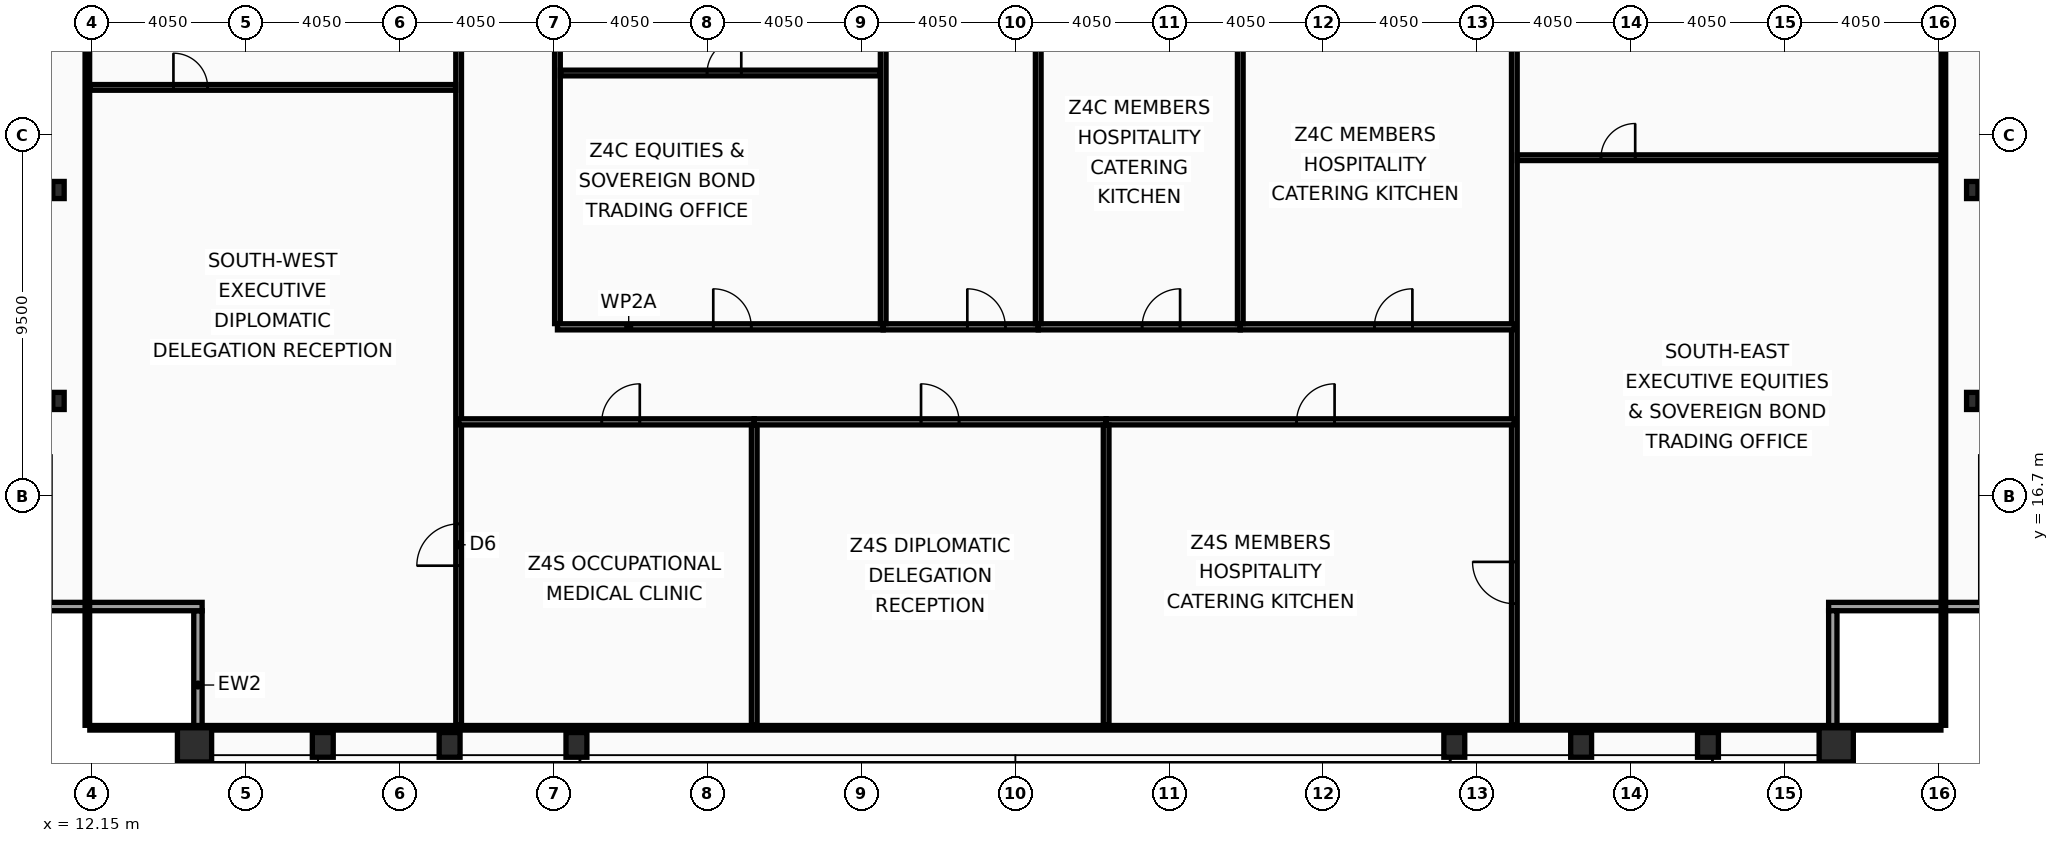
"""IFC4 building model, lengths in metres.
Left out: names, types, materials, properties, quantities, classifications, styles, units other than length and angle.
Written with IfcOpenShell. Run it as: python <this file> out.ifc"""

import sys

from ifc_helpers import new_model, si_unit, direction, frame, frame_2d, origin, origin_2d, place, context, subcontext, project, spatial, rectangle, hollow_rectangle, i_section, extrude, element, fill, save


model = new_model("IFC4")
c1 = context("Model", 3, precision=1e-05, world=origin(), true_north=direction((0.0, 1.0)))
c2 = subcontext(c1, "Body", "Model", "MODEL_VIEW")
j1 = project(units=[si_unit("LENGTHUNIT", "METRE"), si_unit("PLANEANGLEUNIT", "RADIAN")], contexts=[c1])
p1 = place(None, origin())
s1 = spatial("IfcSite", under=j1, at=p1, CompositionType="ELEMENT")
p2 = place(p1, origin())
s2 = spatial("IfcBuilding", under=s1, at=p2, CompositionType="ELEMENT")
p3 = place(p2, frame((0.0, 0.0, 321.8)))
s3 = spatial("IfcBuildingStorey", under=s2, at=p3, CompositionType="ELEMENT", Elevation=321.8)
for number, where, z_axis, x_axis in (
    (1, (14.85, 10.15, 0.0), (0.0, 0.0, 1.0), (1.0, 0.0, 0.0)),
    (2, (58.05, 10.15, 0.0), (0.0, 0.0, 1.0), (1.0, 0.0, 0.0)),
):
    element("IfcColumn", number, at=place(p3, frame(where, z_axis=z_axis, x_axis=x_axis)), inside=s3, PredefinedType="COLUMN", context=c2, shape_type="SweptSolid", body=[
        extrude(hollow_rectangle(XDim=0.9, YDim=0.9, WallThickness=0.05, at=origin_2d()), origin(), (0.0, 0.0, 1.0), 3.6),
    ])
for number, where, z_axis, x_axis in (
    (3, (18.225, 10.15, 0.0), (0.0, 0.0, 1.0), (1.0, 0.0, 0.0)),
    (4, (21.562, 10.15, 0.0), (0.0, 0.0, 1.0), (1.0, 0.0, 0.0)),
    (5, (24.9, 10.15, 0.0), (0.0, 0.0, 1.0), (1.0, 0.0, 0.0)),
    (6, (48.0, 10.15, 0.0), (0.0, 0.0, 1.0), (1.0, 0.0, 0.0)),
    (7, (51.337, 10.15, 0.0), (0.0, 0.0, 1.0), (1.0, 0.0, 0.0)),
    (8, (54.675, 10.15, 0.0), (0.0, 0.0, 1.0), (1.0, 0.0, 0.0)),
):
    element("IfcColumn", number, at=place(p3, frame(where, z_axis=z_axis, x_axis=x_axis)), inside=s3, PredefinedType="COLUMN", context=c2, shape_type="SweptSolid", body=[
        extrude(hollow_rectangle(XDim=0.55, YDim=0.65, WallThickness=0.04, at=origin_2d()), origin(), (0.0, 0.0, 1.0), 3.6),
    ])
for number, where, z_axis, x_axis in (
    (9, (11.27, 19.2, 0.0), (0.0, 0.0, 1.0), (1.0, 0.0, 0.0)),
    (10, (11.27, 24.75, 0.0), (0.0, 0.0, 1.0), (1.0, 0.0, 0.0)),
    (11, (61.63, 19.2, 0.0), (0.0, 0.0, 1.0), (1.0, 0.0, 0.0)),
    (12, (61.63, 24.75, 0.0), (0.0, 0.0, 1.0), (1.0, 0.0, 0.0)),
):
    element("IfcColumn", number, at=place(p3, frame(where, z_axis=z_axis, x_axis=x_axis)), inside=s3, PredefinedType="COLUMN", context=c2, shape_type="SweptSolid", body=[
        extrude(i_section(OverallWidth=0.3, OverallDepth=0.45, WebThickness=0.014, FlangeThickness=0.026, at=origin_2d()), origin(), (0.0, 0.0, 1.0), 3.6),
    ])
p4 = place(p3, frame((14.94, 9.77, 0.0), z_axis=(0.0, 0.0, 1.0), x_axis=(0.0, 1.0, 0.0)))
e13 = element("IfcWall", 13, at=p4, inside=s3, PredefinedType="SOLIDWALL", context=c2, shape_type="SweptSolid", body=[
    extrude(rectangle(XDim=3.91, YDim=0.22, at=frame_2d((1.955, 0.0))), origin(), (0.0, 0.0, 1.0), 2.88),
])
for number, where, z_axis, x_axis in (
    (14, (15.05, 13.79, 0.0), (0.0, 0.0, 1.0), (-1.0, 0.0, 0.0)),
    (15, (62.07, 13.79, 0.0), (0.0, 0.0, 1.0), (-1.0, 0.0, 0.0)),
):
    element("IfcWall", number, at=place(p3, frame(where, z_axis=z_axis, x_axis=x_axis)), inside=s3, PredefinedType="SOLIDWALL", context=c2, shape_type="SweptSolid", body=[
        extrude(rectangle(XDim=4.22, YDim=0.22, at=frame_2d((2.11, 0.0))), origin(), (0.0, 0.0, 1.0), 2.88),
    ])
p5 = place(p3, frame((57.96, 13.68, 0.0), z_axis=(0.0, 0.0, 1.0), x_axis=(0.0, -1.0, 0.0)))
e16 = element("IfcWall", 16, at=p5, inside=s3, PredefinedType="SOLIDWALL", context=c2, shape_type="SweptSolid", body=[
    extrude(rectangle(XDim=3.91, YDim=0.22, at=frame_2d((1.955, 0.0))), origin(), (0.0, 0.0, 1.0), 2.88),
])
p6 = place(p3, frame((21.8, 10.665, 0.0), z_axis=(0.0, 0.0, 1.0), x_axis=(0.0, 1.0, 0.0)))
e17 = element("IfcWall", 17, at=p6, inside=s3, PredefinedType="PARTITIONING", context=c2, shape_type="SweptSolid", body=[
    extrude(rectangle(XDim=24.955, YDim=0.15, at=frame_2d((12.478, 0.0))), origin(), (0.0, 0.0, 1.0), 3.07),
])
p7 = place(p6, frame((4.2, 0.0, 0.0)))
e18 = element("IfcOpeningElement", 18, at=p7, cuts=e17, PredefinedType="OPENING", context=c2, shape_type="SweptSolid", body=[
    extrude(rectangle(XDim=1.1, YDim=2.1, at=frame_2d((0.55, 1.05))), frame((0.0, 0.085, 0.0), z_axis=(0.0, -1.0, 0.0), x_axis=(1.0, 0.0, 0.0)), (0.0, 0.0, 1.0), 0.17),
])
p8 = place(p3, frame((12.095, 27.45, 0.0), z_axis=(0.0, 0.0, 1.0), x_axis=(1.0, 0.0, 0.0)))
e19 = element("IfcWall", 19, at=p8, inside=s3, PredefinedType="PARTITIONING", context=c2, shape_type="SweptSolid", body=[
    extrude(rectangle(XDim=9.625, YDim=0.15, at=frame_2d((4.812, 0.0))), origin(), (0.0, 0.0, 1.0), 2.83),
])
p9 = place(p8, frame((2.2, 0.0, 0.0)))
e20 = element("IfcOpeningElement", 20, at=p9, cuts=e19, PredefinedType="OPENING", context=c2, shape_type="SweptSolid", body=[
    extrude(rectangle(XDim=0.9, YDim=2.05, at=frame_2d((0.45, 1.025))), frame((0.0, 0.085, 0.0), z_axis=(0.0, -1.0, 0.0), x_axis=(1.0, 0.0, 0.0)), (0.0, 0.0, 1.0), 0.17),
])
p10 = place(p3, frame((24.4, 21.235, 0.0), z_axis=(0.0, 0.0, 1.0), x_axis=(0.0, 1.0, 0.0)))
e21 = element("IfcWall", 21, at=p10, inside=s3, PredefinedType="PARTITIONING", context=c2, shape_type="SweptSolid", body=[
    extrude(rectangle(XDim=14.385, YDim=0.15, at=frame_2d((7.192, 0.0))), origin(), (0.0, 0.0, 1.0), 2.83),
])
p11 = place(p3, frame((49.58, 10.665, 0.0), z_axis=(0.0, 0.0, 1.0), x_axis=(0.0, 1.0, 0.0)))
e22 = element("IfcWall", 22, at=p11, inside=s3, PredefinedType="PARTITIONING", context=c2, shape_type="SweptSolid", body=[
    extrude(rectangle(XDim=24.955, YDim=0.15, at=frame_2d((12.478, 0.0))), origin(), (0.0, 0.0, 1.0), 3.07),
])
p12 = place(p11, frame((3.2, 0.0, 0.0)))
e23 = element("IfcOpeningElement", 23, at=p12, cuts=e22, PredefinedType="OPENING", context=c2, shape_type="SweptSolid", body=[
    extrude(rectangle(XDim=1.1, YDim=2.1, at=frame_2d((0.55, 1.05))), frame((0.0, 0.085, 0.0), z_axis=(0.0, -1.0, 0.0), x_axis=(1.0, 0.0, 0.0)), (0.0, 0.0, 1.0), 0.17),
])
p13 = place(p3, frame((49.66, 25.6, 0.0), z_axis=(0.0, 0.0, 1.0), x_axis=(1.0, 0.0, 0.0)))
e24 = element("IfcWall", 24, at=p13, inside=s3, PredefinedType="PARTITIONING", context=c2, shape_type="SweptSolid", body=[
    extrude(rectangle(XDim=11.145, YDim=0.15, at=frame_2d((5.573, 0.0))), origin(), (0.0, 0.0, 1.0), 2.83),
])
p14 = place(p13, frame((2.2, 0.0, 0.0)))
e25 = element("IfcOpeningElement", 25, at=p14, cuts=e24, PredefinedType="OPENING", context=c2, shape_type="SweptSolid", body=[
    extrude(rectangle(XDim=0.9, YDim=2.05, at=frame_2d((0.45, 1.025))), frame((0.0, 0.085, 0.0), z_axis=(0.0, -1.0, 0.0), x_axis=(1.0, 0.0, 0.0)), (0.0, 0.0, 1.0), 0.17),
])
p15 = place(p3, frame((24.4, 21.15, 0.0), z_axis=(0.0, 0.0, 1.0), x_axis=(1.0, 0.0, 0.0)))
e26 = element("IfcWall", 26, at=p15, inside=s3, PredefinedType="PARTITIONING", context=c2, shape_type="SweptSolid", body=[
    extrude(rectangle(XDim=8.572, YDim=0.16, at=frame_2d((4.286, 0.0))), origin(), (0.0, 0.0, 1.0), 2.83),
])
p16 = place(p15, frame((4.1, 0.0, 0.0)))
e27 = element("IfcOpeningElement", 27, at=p16, cuts=e26, PredefinedType="OPENING", context=c2, shape_type="SweptSolid", body=[
    extrude(rectangle(XDim=1.0, YDim=2.05, at=frame_2d((0.5, 1.025))), frame((0.0, 0.09, 0.0), z_axis=(0.0, -1.0, 0.0), x_axis=(1.0, 0.0, 0.0)), (0.0, 0.0, 1.0), 0.18),
])
p17 = place(p3, frame((24.48, 27.829, 0.0), z_axis=(0.0, 0.0, 1.0), x_axis=(1.0, 0.0, 0.0)))
e28 = element("IfcWall", 28, at=p17, inside=s3, PredefinedType="PARTITIONING", context=c2, shape_type="SweptSolid", body=[
    extrude(rectangle(XDim=8.412, YDim=0.15, at=frame_2d((4.206, 0.0))), origin(), (0.0, 0.0, 1.0), 2.83),
])
p18 = place(p17, frame((3.857, 0.0, 0.0)))
e29 = element("IfcOpeningElement", 29, at=p18, cuts=e28, PredefinedType="OPENING", context=c2, shape_type="SweptSolid", body=[
    extrude(rectangle(XDim=0.9, YDim=2.05, at=frame_2d((0.45, 1.025))), frame((0.0, 0.085, 0.0), z_axis=(0.0, -1.0, 0.0), x_axis=(1.0, 0.0, 0.0)), (0.0, 0.0, 1.0), 0.17),
])
p19 = place(p3, frame((32.972, 21.15, 0.0), z_axis=(0.0, 0.0, 1.0), x_axis=(1.0, 0.0, 0.0)))
e30 = element("IfcWall", 30, at=p19, inside=s3, PredefinedType="PARTITIONING", context=c2, shape_type="SweptSolid", body=[
    extrude(rectangle(XDim=4.08, YDim=0.16, at=frame_2d((2.04, 0.0))), origin(), (0.0, 0.0, 1.0), 3.44),
])
p20 = place(p19, frame((2.214, 0.0, 0.0)))
e31 = element("IfcOpeningElement", 31, at=p20, cuts=e30, PredefinedType="OPENING", context=c2, shape_type="SweptSolid", body=[
    extrude(rectangle(XDim=1.0, YDim=2.05, at=frame_2d((0.5, 1.025))), frame((0.0, 0.09, 0.0), z_axis=(0.0, -1.0, 0.0), x_axis=(1.0, 0.0, 0.0)), (0.0, 0.0, 1.0), 0.18),
])
p21 = place(p3, frame((32.972, 21.235, 0.0), z_axis=(0.0, 0.0, 1.0), x_axis=(0.0, 1.0, 0.0)))
e32 = element("IfcWall", 32, at=p21, inside=s3, PredefinedType="PARTITIONING", context=c2, shape_type="SweptSolid", body=[
    extrude(rectangle(XDim=14.385, YDim=0.15, at=frame_2d((7.192, 0.0))), origin(), (0.0, 0.0, 1.0), 3.07),
])
p22 = place(p3, frame((37.052, 21.15, 0.0), z_axis=(0.0, 0.0, 1.0), x_axis=(1.0, 0.0, 0.0)))
e33 = element("IfcWall", 33, at=p22, inside=s3, PredefinedType="PARTITIONING", context=c2, shape_type="SweptSolid", body=[
    extrude(rectangle(XDim=5.316, YDim=0.16, at=frame_2d((2.658, 0.0))), origin(), (0.0, 0.0, 1.0), 3.44),
])
p23 = place(p22, frame((2.733, 0.0, 0.0)))
e34 = element("IfcOpeningElement", 34, at=p23, cuts=e33, PredefinedType="OPENING", context=c2, shape_type="SweptSolid", body=[
    extrude(rectangle(XDim=1.0, YDim=2.05, at=frame_2d((0.5, 1.025))), frame((0.0, 0.09, 0.0), z_axis=(0.0, -1.0, 0.0), x_axis=(1.0, 0.0, 0.0)), (0.0, 0.0, 1.0), 0.18),
])
p24 = place(p3, frame((37.052, 21.235, 0.0), z_axis=(0.0, 0.0, 1.0), x_axis=(0.0, 1.0, 0.0)))
e35 = element("IfcWall", 35, at=p24, inside=s3, PredefinedType="PARTITIONING", context=c2, shape_type="SweptSolid", body=[
    extrude(rectangle(XDim=14.385, YDim=0.15, at=frame_2d((7.192, 0.0))), origin(), (0.0, 0.0, 1.0), 3.07),
])
p25 = place(p3, frame((42.368, 21.15, 0.0), z_axis=(0.0, 0.0, 1.0), x_axis=(1.0, 0.0, 0.0)))
e36 = element("IfcWall", 36, at=p25, inside=s3, PredefinedType="PARTITIONING", context=c2, shape_type="SweptSolid", body=[
    extrude(rectangle(XDim=7.212, YDim=0.16, at=frame_2d((3.606, 0.0))), origin(), (0.0, 0.0, 1.0), 2.83),
])
p26 = place(p25, frame((3.529, 0.0, 0.0)))
e37 = element("IfcOpeningElement", 37, at=p26, cuts=e36, PredefinedType="OPENING", context=c2, shape_type="SweptSolid", body=[
    extrude(rectangle(XDim=1.0, YDim=2.05, at=frame_2d((0.5, 1.025))), frame((0.0, 0.09, 0.0), z_axis=(0.0, -1.0, 0.0), x_axis=(1.0, 0.0, 0.0)), (0.0, 0.0, 1.0), 0.18),
])
p27 = place(p3, frame((42.368, 21.235, 0.0), z_axis=(0.0, 0.0, 1.0), x_axis=(0.0, 1.0, 0.0)))
e38 = element("IfcWall", 38, at=p27, inside=s3, PredefinedType="PARTITIONING", context=c2, shape_type="SweptSolid", body=[
    extrude(rectangle(XDim=14.385, YDim=0.15, at=frame_2d((7.192, 0.0))), origin(), (0.0, 0.0, 1.0), 3.07),
])
p28 = place(p3, frame((21.8, 18.65, 0.0), z_axis=(0.0, 0.0, 1.0), x_axis=(1.0, 0.0, 0.0)))
e39 = element("IfcWall", 39, at=p28, inside=s3, PredefinedType="PARTITIONING", context=c2, shape_type="SweptSolid", body=[
    extrude(rectangle(XDim=7.778, YDim=0.16, at=frame_2d((3.889, 0.0))), origin(), (0.0, 0.0, 1.0), 2.83),
])
p29 = place(p28, frame((3.767, 0.0, 0.0)))
e40 = element("IfcOpeningElement", 40, at=p29, cuts=e39, PredefinedType="OPENING", context=c2, shape_type="SweptSolid", body=[
    extrude(rectangle(XDim=1.0, YDim=2.05, at=frame_2d((0.5, 1.025))), frame((0.0, 0.09, 0.0), z_axis=(0.0, -1.0, 0.0), x_axis=(1.0, 0.0, 0.0)), (0.0, 0.0, 1.0), 0.18),
])
p30 = place(p3, frame((29.578, 18.65, 0.0), z_axis=(0.0, 0.0, 1.0), x_axis=(1.0, 0.0, 0.0)))
e41 = element("IfcWall", 41, at=p30, inside=s3, PredefinedType="PARTITIONING", context=c2, shape_type="SweptSolid", body=[
    extrude(rectangle(XDim=9.26, YDim=0.16, at=frame_2d((4.63, 0.0))), origin(), (0.0, 0.0, 1.0), 3.44),
])
p31 = place(p30, frame((4.389, 0.0, 0.0)))
e42 = element("IfcOpeningElement", 42, at=p31, cuts=e41, PredefinedType="OPENING", context=c2, shape_type="SweptSolid", body=[
    extrude(rectangle(XDim=1.0, YDim=2.05, at=frame_2d((0.5, 1.025))), frame((0.0, 0.09, 0.0), z_axis=(0.0, -1.0, 0.0), x_axis=(1.0, 0.0, 0.0)), (0.0, 0.0, 1.0), 0.18),
])
p32 = place(p3, frame((29.578, 10.665, 0.0), z_axis=(0.0, 0.0, 1.0), x_axis=(0.0, 1.0, 0.0)))
e43 = element("IfcWall", 43, at=p32, inside=s3, PredefinedType="PARTITIONING", context=c2, shape_type="SweptSolid", body=[
    extrude(rectangle(XDim=7.9, YDim=0.15, at=frame_2d((3.95, 0.0))), origin(), (0.0, 0.0, 1.0), 3.07),
])
p33 = place(p3, frame((38.838, 18.65, 0.0), z_axis=(0.0, 0.0, 1.0), x_axis=(1.0, 0.0, 0.0)))
e44 = element("IfcWall", 44, at=p33, inside=s3, PredefinedType="PARTITIONING", context=c2, shape_type="SweptSolid", body=[
    extrude(rectangle(XDim=10.742, YDim=0.16, at=frame_2d((5.371, 0.0))), origin(), (0.0, 0.0, 1.0), 2.83),
])
p34 = place(p33, frame((5.011, 0.0, 0.0)))
e45 = element("IfcOpeningElement", 45, at=p34, cuts=e44, PredefinedType="OPENING", context=c2, shape_type="SweptSolid", body=[
    extrude(rectangle(XDim=1.0, YDim=2.05, at=frame_2d((0.5, 1.025))), frame((0.0, 0.09, 0.0), z_axis=(0.0, -1.0, 0.0), x_axis=(1.0, 0.0, 0.0)), (0.0, 0.0, 1.0), 0.18),
])
p35 = place(p3, frame((38.838, 10.665, 0.0), z_axis=(0.0, 0.0, 1.0), x_axis=(0.0, 1.0, 0.0)))
e46 = element("IfcWall", 46, at=p35, inside=s3, PredefinedType="PARTITIONING", context=c2, shape_type="SweptSolid", body=[
    extrude(rectangle(XDim=7.9, YDim=0.15, at=frame_2d((3.95, 0.0))), origin(), (0.0, 0.0, 1.0), 3.07),
])
for number, where, z_axis, x_axis in (
    (47, (12.03, 10.665, 0.0), (0.0, 0.0, 1.0), (0.0, 1.0, 0.0)),
    (48, (60.87, 10.665, 0.0), (0.0, 0.0, 1.0), (0.0, 1.0, 0.0)),
):
    element("IfcWall", number, at=place(p3, frame(where, z_axis=z_axis, x_axis=x_axis)), inside=s3, PredefinedType="PARTITIONING", context=c2, shape_type="SweptSolid", body=[
        extrude(rectangle(XDim=42.11, YDim=0.12, at=frame_2d((21.055, 0.0))), origin(), (0.0, 0.0, 1.0), 2.83),
    ])
p36 = place(p3, frame((12.095, 10.6, 0.0), z_axis=(0.0, 0.0, 1.0), x_axis=(1.0, 0.0, 0.0)))
e49 = element("IfcWall", 49, at=p36, inside=s3, PredefinedType="PARTITIONING", context=c2, shape_type="SweptSolid", body=[
    extrude(rectangle(XDim=48.71, YDim=0.12, at=frame_2d((24.355, 0.0))), origin(), (0.0, 0.0, 1.0), 2.83),
])
p37 = place(p7, origin())
e50 = element("IfcDoor", 50, at=p37, inside=s3, OperationType="SINGLE_SWING_LEFT", PredefinedType="DOOR", context=c2, shape_type="SweptSolid", body=[
    extrude(rectangle(XDim=1.1, YDim=2.1, at=frame_2d((0.55, 1.05))), frame((0.0, 0.025, 0.0), z_axis=(0.0, -1.0, 0.0), x_axis=(1.0, 0.0, 0.0)), (0.0, 0.0, 1.0), 0.05),
])
fill(e18, e50)
p38 = place(p9, origin())
e51 = element("IfcDoor", 51, at=p38, inside=s3, OperationType="SINGLE_SWING_LEFT", PredefinedType="DOOR", context=c2, shape_type="SweptSolid", body=[
    extrude(rectangle(XDim=0.9, YDim=2.05, at=frame_2d((0.45, 1.025))), frame((0.0, 0.025, 0.0), z_axis=(0.0, -1.0, 0.0), x_axis=(1.0, 0.0, 0.0)), (0.0, 0.0, 1.0), 0.05),
])
fill(e20, e51)
p39 = place(p12, origin())
e52 = element("IfcDoor", 52, at=p39, inside=s3, OperationType="SINGLE_SWING_RIGHT", PredefinedType="DOOR", context=c2, shape_type="SweptSolid", body=[
    extrude(rectangle(XDim=1.1, YDim=2.1, at=frame_2d((0.55, 1.05))), frame((0.0, 0.025, 0.0), z_axis=(0.0, -1.0, 0.0), x_axis=(1.0, 0.0, 0.0)), (0.0, 0.0, 1.0), 0.05),
])
fill(e23, e52)
p40 = place(p14, origin())
e53 = element("IfcDoor", 53, at=p40, inside=s3, OperationType="SINGLE_SWING_RIGHT", PredefinedType="DOOR", context=c2, shape_type="SweptSolid", body=[
    extrude(rectangle(XDim=0.9, YDim=2.05, at=frame_2d((0.45, 1.025))), frame((0.0, 0.025, 0.0), z_axis=(0.0, -1.0, 0.0), x_axis=(1.0, 0.0, 0.0)), (0.0, 0.0, 1.0), 0.05),
])
fill(e25, e53)
p41 = place(p16, origin())
e54 = element("IfcDoor", 54, at=p41, inside=s3, OperationType="SINGLE_SWING_LEFT", PredefinedType="DOOR", context=c2, shape_type="SweptSolid", body=[
    extrude(rectangle(XDim=1.0, YDim=2.05, at=frame_2d((0.5, 1.025))), frame((0.0, 0.025, 0.0), z_axis=(0.0, -1.0, 0.0), x_axis=(1.0, 0.0, 0.0)), (0.0, 0.0, 1.0), 0.05),
])
fill(e27, e54)
p42 = place(p18, origin())
e55 = element("IfcDoor", 55, at=p42, inside=s3, OperationType="SINGLE_SWING_RIGHT", PredefinedType="DOOR", context=c2, shape_type="SweptSolid", body=[
    extrude(rectangle(XDim=0.9, YDim=2.05, at=frame_2d((0.45, 1.025))), frame((0.0, 0.025, 0.0), z_axis=(0.0, -1.0, 0.0), x_axis=(1.0, 0.0, 0.0)), (0.0, 0.0, 1.0), 0.05),
])
fill(e29, e55)
p43 = place(p20, origin())
e56 = element("IfcDoor", 56, at=p43, inside=s3, OperationType="SINGLE_SWING_LEFT", PredefinedType="DOOR", context=c2, shape_type="SweptSolid", body=[
    extrude(rectangle(XDim=1.0, YDim=2.05, at=frame_2d((0.5, 1.025))), frame((0.0, 0.025, 0.0), z_axis=(0.0, -1.0, 0.0), x_axis=(1.0, 0.0, 0.0)), (0.0, 0.0, 1.0), 0.05),
])
fill(e31, e56)
p44 = place(p23, origin())
e57 = element("IfcDoor", 57, at=p44, inside=s3, OperationType="SINGLE_SWING_RIGHT", PredefinedType="DOOR", context=c2, shape_type="SweptSolid", body=[
    extrude(rectangle(XDim=1.0, YDim=2.05, at=frame_2d((0.5, 1.025))), frame((0.0, 0.025, 0.0), z_axis=(0.0, -1.0, 0.0), x_axis=(1.0, 0.0, 0.0)), (0.0, 0.0, 1.0), 0.05),
])
fill(e34, e57)
p45 = place(p26, origin())
e58 = element("IfcDoor", 58, at=p45, inside=s3, OperationType="SINGLE_SWING_RIGHT", PredefinedType="DOOR", context=c2, shape_type="SweptSolid", body=[
    extrude(rectangle(XDim=1.0, YDim=2.05, at=frame_2d((0.5, 1.025))), frame((0.0, 0.025, 0.0), z_axis=(0.0, -1.0, 0.0), x_axis=(1.0, 0.0, 0.0)), (0.0, 0.0, 1.0), 0.05),
])
fill(e37, e58)
p46 = place(p29, origin())
e59 = element("IfcDoor", 59, at=p46, inside=s3, OperationType="SINGLE_SWING_RIGHT", PredefinedType="DOOR", context=c2, shape_type="SweptSolid", body=[
    extrude(rectangle(XDim=1.0, YDim=2.05, at=frame_2d((0.5, 1.025))), frame((0.0, 0.025, 0.0), z_axis=(0.0, -1.0, 0.0), x_axis=(1.0, 0.0, 0.0)), (0.0, 0.0, 1.0), 0.05),
])
fill(e40, e59)
p47 = place(p31, origin())
e60 = element("IfcDoor", 60, at=p47, inside=s3, OperationType="SINGLE_SWING_LEFT", PredefinedType="DOOR", context=c2, shape_type="SweptSolid", body=[
    extrude(rectangle(XDim=1.0, YDim=2.05, at=frame_2d((0.5, 1.025))), frame((0.0, 0.025, 0.0), z_axis=(0.0, -1.0, 0.0), x_axis=(1.0, 0.0, 0.0)), (0.0, 0.0, 1.0), 0.05),
])
fill(e42, e60)
p48 = place(p34, origin())
e61 = element("IfcDoor", 61, at=p48, inside=s3, OperationType="SINGLE_SWING_RIGHT", PredefinedType="DOOR", context=c2, shape_type="SweptSolid", body=[
    extrude(rectangle(XDim=1.0, YDim=2.05, at=frame_2d((0.5, 1.025))), frame((0.0, 0.025, 0.0), z_axis=(0.0, -1.0, 0.0), x_axis=(1.0, 0.0, 0.0)), (0.0, 0.0, 1.0), 0.05),
])
fill(e45, e61)
save(model, sys.argv[1])
